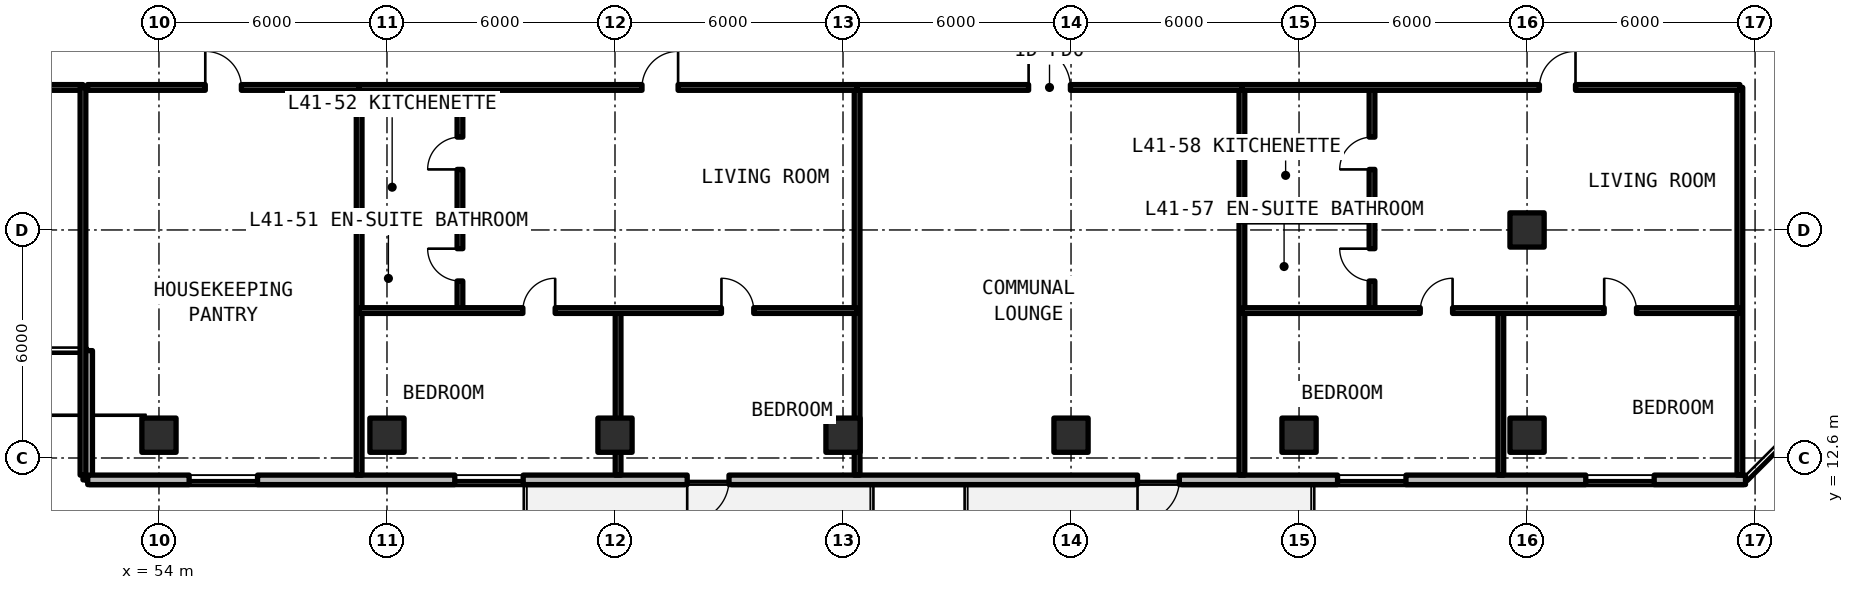
"""IFC4 building model, lengths in metres.
Left out: names, types, materials, properties, quantities, classifications, styles, units other than length and angle.
Written with IfcOpenShell. Run it as: python <this file> out.ifc"""

import sys

from ifc_helpers import new_model, si_unit, direction, frame, frame_2d, origin, origin_2d, place, context, subcontext, project, spatial, rectangle, extrude, element, fill, save


model = new_model("IFC4")
c1 = context("Model", 3, precision=1e-05, world=origin(), true_north=direction((0.0, 1.0)))
c2 = subcontext(c1, "Body", "Model", "MODEL_VIEW")
j1 = project(units=[si_unit("LENGTHUNIT", "METRE"), si_unit("PLANEANGLEUNIT", "RADIAN")], contexts=[c1])
p1 = place(None, origin())
s1 = spatial("IfcSite", under=j1, at=p1, CompositionType="ELEMENT")
p2 = place(p1, origin())
s2 = spatial("IfcBuilding", under=s1, at=p2, CompositionType="ELEMENT")
p3 = place(p2, frame((0.0, 0.0, 148.5)))
s3 = spatial("IfcBuildingStorey", under=s2, at=p3, CompositionType="ELEMENT", Elevation=148.5)
for number, where, z_axis, x_axis in (
    (1, (90.0, 18.6, 0.0), (0.0, 0.0, 1.0), (1.0, 0.0, 0.0)),
    (2, (54.0, 13.2, 0.0), (0.0, 0.0, 1.0), (1.0, 0.0, 0.0)),
    (3, (60.0, 13.2, 0.0), (0.0, 0.0, 1.0), (1.0, 0.0, 0.0)),
    (4, (66.0, 13.2, 0.0), (0.0, 0.0, 1.0), (1.0, 0.0, 0.0)),
    (5, (72.0, 13.2, 0.0), (0.0, 0.0, 1.0), (1.0, 0.0, 0.0)),
    (6, (78.0, 13.2, 0.0), (0.0, 0.0, 1.0), (1.0, 0.0, 0.0)),
    (7, (84.0, 13.2, 0.0), (0.0, 0.0, 1.0), (1.0, 0.0, 0.0)),
    (8, (90.0, 13.2, 0.0), (0.0, 0.0, 1.0), (1.0, 0.0, 0.0)),
):
    element("IfcColumn", number, at=place(p3, frame(where, z_axis=z_axis, x_axis=x_axis)), inside=s3, PredefinedType="COLUMN", context=c2, shape_type="SweptSolid", body=[
        extrude(rectangle(XDim=0.9, YDim=0.9, at=origin_2d()), origin(), (0.0, 0.0, 1.0), 3.3),
    ])
p4 = place(p3, frame((52.125, 15.425, 0.0), z_axis=(0.0, 0.0, 1.0), x_axis=(0.0, -1.0, 0.0)))
e9 = element("IfcWall", 9, at=p4, inside=s3, PredefinedType="SOLIDWALL", context=c2, shape_type="SweptSolid", body=[
    extrude(rectangle(XDim=3.4, YDim=0.25, at=frame_2d((1.7, 0.0))), origin(), (0.0, 0.0, 1.0), 3.08),
])
p5 = place(p3, frame((52.125, 12.025, 0.0), z_axis=(0.0, 0.0, 1.0), x_axis=(1.0, 0.0, 0.0)))
e10 = element("IfcWall", 10, at=p5, inside=s3, PredefinedType="SOLIDWALL", context=c2, shape_type="SweptSolid", body=[
    extrude(rectangle(XDim=43.623, YDim=0.25, at=frame_2d((21.812, 0.0))), origin(), (0.0, 0.0, 1.0), 3.08),
])
p6 = place(p5, frame((15.775, 0.0, 0.0)))
e11 = element("IfcOpeningElement", 11, at=p6, cuts=e10, PredefinedType="OPENING", context=c2, shape_type="SweptSolid", body=[
    extrude(rectangle(XDim=1.1, YDim=2.15, at=frame_2d((0.55, 1.075))), frame((0.0, 0.135, 0.0), z_axis=(0.0, -1.0, 0.0), x_axis=(1.0, 0.0, 0.0)), (0.0, 0.0, 1.0), 0.27),
])
p7 = place(p5, frame((27.625, 0.0, 0.0)))
e12 = element("IfcOpeningElement", 12, at=p7, cuts=e10, PredefinedType="OPENING", context=c2, shape_type="SweptSolid", body=[
    extrude(rectangle(XDim=1.1, YDim=2.15, at=frame_2d((0.55, 1.075))), frame((0.0, 0.135, 0.0), z_axis=(0.0, -1.0, 0.0), x_axis=(1.0, 0.0, 0.0)), (0.0, 0.0, 1.0), 0.27),
])
p8 = place(p5, frame((2.669, 0.0, 0.78)))
e13 = element("IfcOpeningElement", 13, at=p8, cuts=e10, PredefinedType="OPENING", context=c2, shape_type="SweptSolid", body=[
    extrude(rectangle(XDim=1.8, YDim=1.66, at=frame_2d((0.9, 0.83))), frame((0.0, 0.135, 0.0), z_axis=(0.0, -1.0, 0.0), x_axis=(1.0, 0.0, 0.0)), (0.0, 0.0, 1.0), 0.27),
])
p9 = place(p5, frame((9.659, 0.0, 0.78)))
e14 = element("IfcOpeningElement", 14, at=p9, cuts=e10, PredefinedType="OPENING", context=c2, shape_type="SweptSolid", body=[
    extrude(rectangle(XDim=1.8, YDim=1.66, at=frame_2d((0.9, 0.83))), frame((0.0, 0.135, 0.0), z_axis=(0.0, -1.0, 0.0), x_axis=(1.0, 0.0, 0.0)), (0.0, 0.0, 1.0), 0.27),
])
p10 = place(p5, frame((32.888, 0.0, 0.78)))
e15 = element("IfcOpeningElement", 15, at=p10, cuts=e10, PredefinedType="OPENING", context=c2, shape_type="SweptSolid", body=[
    extrude(rectangle(XDim=1.8, YDim=1.66, at=frame_2d((0.9, 0.83))), frame((0.0, 0.135, 0.0), z_axis=(0.0, -1.0, 0.0), x_axis=(1.0, 0.0, 0.0)), (0.0, 0.0, 1.0), 0.27),
])
p11 = place(p5, frame((39.42, 0.0, 0.78)))
e16 = element("IfcOpeningElement", 16, at=p11, cuts=e10, PredefinedType="OPENING", context=c2, shape_type="SweptSolid", body=[
    extrude(rectangle(XDim=1.8, YDim=1.66, at=frame_2d((0.9, 0.83))), frame((0.0, 0.135, 0.0), z_axis=(0.0, -1.0, 0.0), x_axis=(1.0, 0.0, 0.0)), (0.0, 0.0, 1.0), 0.27),
])
p12 = place(p3, frame((43.6, 22.35, 0.0), z_axis=(0.0, 0.0, 1.0), x_axis=(1.0, 0.0, 0.0)))
e17 = element("IfcWall", 17, at=p12, inside=s3, PredefinedType="SOLIDWALL", context=c2, shape_type="SweptSolid", body=[
    extrude(rectangle(XDim=8.4, YDim=0.15, at=frame_2d((4.2, 0.0))), origin(), (0.0, 0.0, 1.0), 2.35),
])
p13 = place(p12, frame((3.65, 0.0, 0.0)))
e18 = element("IfcOpeningElement", 18, at=p13, cuts=e17, PredefinedType="OPENING", context=c2, shape_type="SweptSolid", body=[
    extrude(rectangle(XDim=1.1, YDim=2.15, at=frame_2d((0.55, 1.075))), frame((0.0, 0.085, 0.0), z_axis=(0.0, -1.0, 0.0), x_axis=(1.0, 0.0, 0.0)), (0.0, 0.0, 1.0), 0.17),
])
for number, where, z_axis, x_axis in (
    (19, (52.0, 12.15, 0.0), (0.0, 0.0, 1.0), (0.0, 1.0, 0.0)),
    (20, (95.6, 12.15, 0.0), (0.0, 0.0, 1.0), (0.0, 1.0, 0.0)),
    (21, (59.267, 12.15, 0.0), (0.0, 0.0, 1.0), (0.0, 1.0, 0.0)),
):
    element("IfcWall", number, at=place(p3, frame(where, z_axis=z_axis, x_axis=x_axis)), inside=s3, PredefinedType="SOLIDWALL", context=c2, shape_type="SweptSolid", body=[
        extrude(rectangle(XDim=10.2, YDim=0.15, at=frame_2d((5.1, 0.0))), origin(), (0.0, 0.0, 1.0), 2.35),
    ])
p14 = place(p3, frame((52.12, 22.35, 0.0), z_axis=(0.0, 0.0, 1.0), x_axis=(1.0, 0.0, 0.0)))
e22 = element("IfcWall", 22, at=p14, inside=s3, PredefinedType="SOLIDWALL", context=c2, shape_type="SweptSolid", body=[
    extrude(rectangle(XDim=7.147, YDim=0.15, at=frame_2d((3.574, 0.0))), origin(), (0.0, 0.0, 1.0), 2.35),
])
p15 = place(p14, frame((3.099, 0.0, 0.0)))
e23 = element("IfcOpeningElement", 23, at=p15, cuts=e22, PredefinedType="OPENING", context=c2, shape_type="SweptSolid", body=[
    extrude(rectangle(XDim=0.95, YDim=2.15, at=frame_2d((0.475, 1.075))), frame((0.0, 0.085, 0.0), z_axis=(0.0, -1.0, 0.0), x_axis=(1.0, 0.0, 0.0)), (0.0, 0.0, 1.0), 0.17),
])
p16 = place(p3, frame((72.371, 12.15, 0.0), z_axis=(0.0, 0.0, 1.0), x_axis=(0.0, 1.0, 0.0)))
e24 = element("IfcWall", 24, at=p16, inside=s3, PredefinedType="SOLIDWALL", context=c2, shape_type="SweptSolid", body=[
    extrude(rectangle(XDim=10.2, YDim=0.15, at=frame_2d((5.1, 0.0))), origin(), (0.0, 0.0, 1.0), 2.35),
])
p17 = place(p3, frame((59.267, 18.886, 0.0), z_axis=(0.0, 0.0, 1.0), x_axis=(1.0, 0.0, 0.0)))
e25 = element("IfcWall", 25, at=p17, inside=s3, PredefinedType="PARTITIONING", context=c2, shape_type="SweptSolid", body=[
    extrude(rectangle(XDim=2.653, YDim=0.15, at=frame_2d((1.326, 0.0))), origin(), (0.0, 0.0, 1.0), 2.35),
])
p18 = place(p3, frame((61.92, 16.479, 0.0), z_axis=(0.0, 0.0, 1.0), x_axis=(0.0, 1.0, 0.0)))
e26 = element("IfcWall", 26, at=p18, inside=s3, PredefinedType="PARTITIONING", context=c2, shape_type="SweptSolid", body=[
    extrude(rectangle(XDim=5.871, YDim=0.15, at=frame_2d((2.935, 0.0))), origin(), (0.0, 0.0, 1.0), 2.35),
])
p19 = place(p18, frame((0.779, 0.0, 0.0)))
e27 = element("IfcOpeningElement", 27, at=p19, cuts=e26, PredefinedType="OPENING", context=c2, shape_type="SweptSolid", body=[
    extrude(rectangle(XDim=0.85, YDim=2.1, at=frame_2d((0.425, 1.05))), frame((0.0, 0.085, 0.0), z_axis=(0.0, -1.0, 0.0), x_axis=(1.0, 0.0, 0.0)), (0.0, 0.0, 1.0), 0.17),
])
p20 = place(p18, frame((3.714, 0.0, 0.0)))
e28 = element("IfcOpeningElement", 28, at=p20, cuts=e26, PredefinedType="OPENING", context=c2, shape_type="SweptSolid", body=[
    extrude(rectangle(XDim=0.85, YDim=2.1, at=frame_2d((0.425, 1.05))), frame((0.0, 0.085, 0.0), z_axis=(0.0, -1.0, 0.0), x_axis=(1.0, 0.0, 0.0)), (0.0, 0.0, 1.0), 0.17),
])
p21 = place(p3, frame((66.081, 12.15, 0.0), z_axis=(0.0, 0.0, 1.0), x_axis=(0.0, 1.0, 0.0)))
e29 = element("IfcWall", 29, at=p21, inside=s3, PredefinedType="PARTITIONING", context=c2, shape_type="SweptSolid", body=[
    extrude(rectangle(XDim=4.33, YDim=0.15, at=frame_2d((2.165, 0.0))), origin(), (0.0, 0.0, 1.0), 2.35),
])
p22 = place(p3, frame((59.267, 16.479, 0.0), z_axis=(0.0, 0.0, 1.0), x_axis=(1.0, 0.0, 0.0)))
e30 = element("IfcWall", 30, at=p22, inside=s3, PredefinedType="PARTITIONING", context=c2, shape_type="SweptSolid", body=[
    extrude(rectangle(XDim=13.104, YDim=0.15, at=frame_2d((6.552, 0.0))), origin(), (0.0, 0.0, 1.0), 2.35),
])
p23 = place(p22, frame((4.308, 0.0, 0.0)))
e31 = element("IfcOpeningElement", 31, at=p23, cuts=e30, PredefinedType="OPENING", context=c2, shape_type="SweptSolid", body=[
    extrude(rectangle(XDim=0.85, YDim=2.1, at=frame_2d((0.425, 1.05))), frame((0.0, 0.085, 0.0), z_axis=(0.0, -1.0, 0.0), x_axis=(1.0, 0.0, 0.0)), (0.0, 0.0, 1.0), 0.17),
])
p24 = place(p22, frame((9.534, 0.0, 0.0)))
e32 = element("IfcOpeningElement", 32, at=p24, cuts=e30, PredefinedType="OPENING", context=c2, shape_type="SweptSolid", body=[
    extrude(rectangle(XDim=0.85, YDim=2.1, at=frame_2d((0.425, 1.05))), frame((0.0, 0.085, 0.0), z_axis=(0.0, -1.0, 0.0), x_axis=(1.0, 0.0, 0.0)), (0.0, 0.0, 1.0), 0.17),
])
p25 = place(p3, frame((59.267, 22.35, 0.0), z_axis=(0.0, 0.0, 1.0), x_axis=(1.0, 0.0, 0.0)))
e33 = element("IfcWall", 33, at=p25, inside=s3, PredefinedType="SOLIDWALL", context=c2, shape_type="SweptSolid", body=[
    extrude(rectangle(XDim=13.104, YDim=0.15, at=frame_2d((6.552, 0.0))), origin(), (0.0, 0.0, 1.0), 2.35),
])
p26 = place(p25, frame((7.443, 0.0, 0.0)))
e34 = element("IfcOpeningElement", 34, at=p26, cuts=e33, PredefinedType="OPENING", context=c2, shape_type="SweptSolid", body=[
    extrude(rectangle(XDim=0.95, YDim=2.15, at=frame_2d((0.475, 1.075))), frame((0.0, 0.085, 0.0), z_axis=(0.0, -1.0, 0.0), x_axis=(1.0, 0.0, 0.0)), (0.0, 0.0, 1.0), 0.17),
])
p27 = place(p3, frame((82.497, 12.15, 0.0), z_axis=(0.0, 0.0, 1.0), x_axis=(0.0, 1.0, 0.0)))
e35 = element("IfcWall", 35, at=p27, inside=s3, PredefinedType="SOLIDWALL", context=c2, shape_type="SweptSolid", body=[
    extrude(rectangle(XDim=10.2, YDim=0.15, at=frame_2d((5.1, 0.0))), origin(), (0.0, 0.0, 1.0), 2.35),
])
p28 = place(p3, frame((72.371, 22.35, 0.0), z_axis=(0.0, 0.0, 1.0), x_axis=(1.0, 0.0, 0.0)))
e36 = element("IfcWall", 36, at=p28, inside=s3, PredefinedType="SOLIDWALL", context=c2, shape_type="SweptSolid", body=[
    extrude(rectangle(XDim=10.125, YDim=0.15, at=frame_2d((5.063, 0.0))), origin(), (0.0, 0.0, 1.0), 2.35),
])
p29 = place(p28, frame((4.513, 0.0, 0.0)))
e37 = element("IfcOpeningElement", 37, at=p29, cuts=e36, PredefinedType="OPENING", context=c2, shape_type="SweptSolid", body=[
    extrude(rectangle(XDim=1.1, YDim=2.15, at=frame_2d((0.55, 1.075))), frame((0.0, 0.085, 0.0), z_axis=(0.0, -1.0, 0.0), x_axis=(1.0, 0.0, 0.0)), (0.0, 0.0, 1.0), 0.17),
])
p30 = place(p3, frame((82.497, 18.886, 0.0), z_axis=(0.0, 0.0, 1.0), x_axis=(1.0, 0.0, 0.0)))
e38 = element("IfcWall", 38, at=p30, inside=s3, PredefinedType="PARTITIONING", context=c2, shape_type="SweptSolid", body=[
    extrude(rectangle(XDim=3.423, YDim=0.15, at=frame_2d((1.712, 0.0))), origin(), (0.0, 0.0, 1.0), 2.35),
])
p31 = place(p3, frame((85.92, 16.479, 0.0), z_axis=(0.0, 0.0, 1.0), x_axis=(0.0, 1.0, 0.0)))
e39 = element("IfcWall", 39, at=p31, inside=s3, PredefinedType="PARTITIONING", context=c2, shape_type="SweptSolid", body=[
    extrude(rectangle(XDim=5.871, YDim=0.15, at=frame_2d((2.935, 0.0))), origin(), (0.0, 0.0, 1.0), 2.35),
])
p32 = place(p31, frame((0.779, 0.0, 0.0)))
e40 = element("IfcOpeningElement", 40, at=p32, cuts=e39, PredefinedType="OPENING", context=c2, shape_type="SweptSolid", body=[
    extrude(rectangle(XDim=0.85, YDim=2.1, at=frame_2d((0.425, 1.05))), frame((0.0, 0.085, 0.0), z_axis=(0.0, -1.0, 0.0), x_axis=(1.0, 0.0, 0.0)), (0.0, 0.0, 1.0), 0.17),
])
p33 = place(p31, frame((3.714, 0.0, 0.0)))
e41 = element("IfcOpeningElement", 41, at=p33, cuts=e39, PredefinedType="OPENING", context=c2, shape_type="SweptSolid", body=[
    extrude(rectangle(XDim=0.85, YDim=2.1, at=frame_2d((0.425, 1.05))), frame((0.0, 0.085, 0.0), z_axis=(0.0, -1.0, 0.0), x_axis=(1.0, 0.0, 0.0)), (0.0, 0.0, 1.0), 0.17),
])
p34 = place(p3, frame((89.31, 12.15, 0.0), z_axis=(0.0, 0.0, 1.0), x_axis=(0.0, 1.0, 0.0)))
e42 = element("IfcWall", 42, at=p34, inside=s3, PredefinedType="PARTITIONING", context=c2, shape_type="SweptSolid", body=[
    extrude(rectangle(XDim=4.33, YDim=0.15, at=frame_2d((2.165, 0.0))), origin(), (0.0, 0.0, 1.0), 2.35),
])
p35 = place(p3, frame((82.497, 16.479, 0.0), z_axis=(0.0, 0.0, 1.0), x_axis=(1.0, 0.0, 0.0)))
e43 = element("IfcWall", 43, at=p35, inside=s3, PredefinedType="PARTITIONING", context=c2, shape_type="SweptSolid", body=[
    extrude(rectangle(XDim=13.104, YDim=0.15, at=frame_2d((6.552, 0.0))), origin(), (0.0, 0.0, 1.0), 2.35),
])
p36 = place(p35, frame((4.694, 0.0, 0.0)))
e44 = element("IfcOpeningElement", 44, at=p36, cuts=e43, PredefinedType="OPENING", context=c2, shape_type="SweptSolid", body=[
    extrude(rectangle(XDim=0.85, YDim=2.1, at=frame_2d((0.425, 1.05))), frame((0.0, 0.085, 0.0), z_axis=(0.0, -1.0, 0.0), x_axis=(1.0, 0.0, 0.0)), (0.0, 0.0, 1.0), 0.17),
])
p37 = place(p35, frame((9.534, 0.0, 0.0)))
e45 = element("IfcOpeningElement", 45, at=p37, cuts=e43, PredefinedType="OPENING", context=c2, shape_type="SweptSolid", body=[
    extrude(rectangle(XDim=0.85, YDim=2.1, at=frame_2d((0.425, 1.05))), frame((0.0, 0.085, 0.0), z_axis=(0.0, -1.0, 0.0), x_axis=(1.0, 0.0, 0.0)), (0.0, 0.0, 1.0), 0.17),
])
p38 = place(p3, frame((82.497, 22.35, 0.0), z_axis=(0.0, 0.0, 1.0), x_axis=(1.0, 0.0, 0.0)))
e46 = element("IfcWall", 46, at=p38, inside=s3, PredefinedType="SOLIDWALL", context=c2, shape_type="SweptSolid", body=[
    extrude(rectangle(XDim=13.104, YDim=0.15, at=frame_2d((6.552, 0.0))), origin(), (0.0, 0.0, 1.0), 2.35),
])
p39 = place(p38, frame((7.829, 0.0, 0.0)))
e47 = element("IfcOpeningElement", 47, at=p39, cuts=e46, PredefinedType="OPENING", context=c2, shape_type="SweptSolid", body=[
    extrude(rectangle(XDim=0.95, YDim=2.15, at=frame_2d((0.475, 1.075))), frame((0.0, 0.085, 0.0), z_axis=(0.0, -1.0, 0.0), x_axis=(1.0, 0.0, 0.0)), (0.0, 0.0, 1.0), 0.17),
])
p40 = place(p6, frame((1.1, 0.0, 0.0), z_axis=(0.0, 0.0, 1.0), x_axis=(-1.0, 0.0, 0.0)))
e48 = element("IfcDoor", 48, at=p40, inside=s3, OperationType="SINGLE_SWING_LEFT", PredefinedType="DOOR", context=c2, shape_type="SweptSolid", body=[
    extrude(rectangle(XDim=1.1, YDim=2.15, at=frame_2d((0.55, 1.075))), frame((0.0, 0.025, 0.0), z_axis=(0.0, -1.0, 0.0), x_axis=(1.0, 0.0, 0.0)), (0.0, 0.0, 1.0), 0.05),
])
fill(e11, e48)
p41 = place(p7, frame((1.1, 0.0, 0.0), z_axis=(0.0, 0.0, 1.0), x_axis=(-1.0, 0.0, 0.0)))
e49 = element("IfcDoor", 49, at=p41, inside=s3, OperationType="SINGLE_SWING_RIGHT", PredefinedType="DOOR", context=c2, shape_type="SweptSolid", body=[
    extrude(rectangle(XDim=1.1, YDim=2.15, at=frame_2d((0.55, 1.075))), frame((0.0, 0.025, 0.0), z_axis=(0.0, -1.0, 0.0), x_axis=(1.0, 0.0, 0.0)), (0.0, 0.0, 1.0), 0.05),
])
fill(e12, e49)
p42 = place(p8, origin())
e50 = element("IfcWindow", 50, at=p42, inside=s3, PartitioningType="SINGLE_PANEL", PredefinedType="WINDOW", context=c2, shape_type="SweptSolid", body=[
    extrude(rectangle(XDim=1.8, YDim=1.66, at=frame_2d((0.9, 0.83))), frame((0.0, 0.03, 0.0), z_axis=(0.0, -1.0, 0.0), x_axis=(1.0, 0.0, 0.0)), (0.0, 0.0, 1.0), 0.06),
])
fill(e13, e50)
p43 = place(p9, origin())
e51 = element("IfcWindow", 51, at=p43, inside=s3, PartitioningType="SINGLE_PANEL", PredefinedType="WINDOW", context=c2, shape_type="SweptSolid", body=[
    extrude(rectangle(XDim=1.8, YDim=1.66, at=frame_2d((0.9, 0.83))), frame((0.0, 0.03, 0.0), z_axis=(0.0, -1.0, 0.0), x_axis=(1.0, 0.0, 0.0)), (0.0, 0.0, 1.0), 0.06),
])
fill(e14, e51)
p44 = place(p10, origin())
e52 = element("IfcWindow", 52, at=p44, inside=s3, PartitioningType="SINGLE_PANEL", PredefinedType="WINDOW", context=c2, shape_type="SweptSolid", body=[
    extrude(rectangle(XDim=1.8, YDim=1.66, at=frame_2d((0.9, 0.83))), frame((0.0, 0.03, 0.0), z_axis=(0.0, -1.0, 0.0), x_axis=(1.0, 0.0, 0.0)), (0.0, 0.0, 1.0), 0.06),
])
fill(e15, e52)
p45 = place(p11, origin())
e53 = element("IfcWindow", 53, at=p45, inside=s3, PartitioningType="SINGLE_PANEL", PredefinedType="WINDOW", context=c2, shape_type="SweptSolid", body=[
    extrude(rectangle(XDim=1.8, YDim=1.66, at=frame_2d((0.9, 0.83))), frame((0.0, 0.03, 0.0), z_axis=(0.0, -1.0, 0.0), x_axis=(1.0, 0.0, 0.0)), (0.0, 0.0, 1.0), 0.06),
])
fill(e16, e53)
p46 = place(p15, origin())
e54 = element("IfcDoor", 54, at=p46, inside=s3, OperationType="SINGLE_SWING_LEFT", PredefinedType="DOOR", context=c2, shape_type="SweptSolid", body=[
    extrude(rectangle(XDim=0.95, YDim=2.15, at=frame_2d((0.475, 1.075))), frame((0.0, 0.025, 0.0), z_axis=(0.0, -1.0, 0.0), x_axis=(1.0, 0.0, 0.0)), (0.0, 0.0, 1.0), 0.05),
])
fill(e23, e54)
p47 = place(p19, origin())
e55 = element("IfcDoor", 55, at=p47, inside=s3, OperationType="SINGLE_SWING_RIGHT", PredefinedType="DOOR", context=c2, shape_type="SweptSolid", body=[
    extrude(rectangle(XDim=0.85, YDim=2.1, at=frame_2d((0.425, 1.05))), frame((0.0, 0.025, 0.0), z_axis=(0.0, -1.0, 0.0), x_axis=(1.0, 0.0, 0.0)), (0.0, 0.0, 1.0), 0.05),
])
fill(e27, e55)
p48 = place(p20, origin())
e56 = element("IfcDoor", 56, at=p48, inside=s3, OperationType="SINGLE_SWING_LEFT", PredefinedType="DOOR", context=c2, shape_type="SweptSolid", body=[
    extrude(rectangle(XDim=0.85, YDim=2.1, at=frame_2d((0.425, 1.05))), frame((0.0, 0.025, 0.0), z_axis=(0.0, -1.0, 0.0), x_axis=(1.0, 0.0, 0.0)), (0.0, 0.0, 1.0), 0.05),
])
fill(e28, e56)
p49 = place(p23, origin())
e57 = element("IfcDoor", 57, at=p49, inside=s3, OperationType="SINGLE_SWING_RIGHT", PredefinedType="DOOR", context=c2, shape_type="SweptSolid", body=[
    extrude(rectangle(XDim=0.85, YDim=2.1, at=frame_2d((0.425, 1.05))), frame((0.0, 0.025, 0.0), z_axis=(0.0, -1.0, 0.0), x_axis=(1.0, 0.0, 0.0)), (0.0, 0.0, 1.0), 0.05),
])
fill(e31, e57)
p50 = place(p24, origin())
e58 = element("IfcDoor", 58, at=p50, inside=s3, OperationType="SINGLE_SWING_LEFT", PredefinedType="DOOR", context=c2, shape_type="SweptSolid", body=[
    extrude(rectangle(XDim=0.85, YDim=2.1, at=frame_2d((0.425, 1.05))), frame((0.0, 0.025, 0.0), z_axis=(0.0, -1.0, 0.0), x_axis=(1.0, 0.0, 0.0)), (0.0, 0.0, 1.0), 0.05),
])
fill(e32, e58)
p51 = place(p26, origin())
e59 = element("IfcDoor", 59, at=p51, inside=s3, OperationType="SINGLE_SWING_RIGHT", PredefinedType="DOOR", context=c2, shape_type="SweptSolid", body=[
    extrude(rectangle(XDim=0.95, YDim=2.15, at=frame_2d((0.475, 1.075))), frame((0.0, 0.025, 0.0), z_axis=(0.0, -1.0, 0.0), x_axis=(1.0, 0.0, 0.0)), (0.0, 0.0, 1.0), 0.05),
])
fill(e34, e59)
p52 = place(p29, origin())
e60 = element("IfcDoor", 60, at=p52, inside=s3, OperationType="SINGLE_SWING_LEFT", PredefinedType="DOOR", context=c2, shape_type="SweptSolid", body=[
    extrude(rectangle(XDim=1.1, YDim=2.15, at=frame_2d((0.55, 1.075))), frame((0.0, 0.025, 0.0), z_axis=(0.0, -1.0, 0.0), x_axis=(1.0, 0.0, 0.0)), (0.0, 0.0, 1.0), 0.05),
])
fill(e37, e60)
p53 = place(p32, origin())
e61 = element("IfcDoor", 61, at=p53, inside=s3, OperationType="SINGLE_SWING_RIGHT", PredefinedType="DOOR", context=c2, shape_type="SweptSolid", body=[
    extrude(rectangle(XDim=0.85, YDim=2.1, at=frame_2d((0.425, 1.05))), frame((0.0, 0.025, 0.0), z_axis=(0.0, -1.0, 0.0), x_axis=(1.0, 0.0, 0.0)), (0.0, 0.0, 1.0), 0.05),
])
fill(e40, e61)
p54 = place(p33, origin())
e62 = element("IfcDoor", 62, at=p54, inside=s3, OperationType="SINGLE_SWING_LEFT", PredefinedType="DOOR", context=c2, shape_type="SweptSolid", body=[
    extrude(rectangle(XDim=0.85, YDim=2.1, at=frame_2d((0.425, 1.05))), frame((0.0, 0.025, 0.0), z_axis=(0.0, -1.0, 0.0), x_axis=(1.0, 0.0, 0.0)), (0.0, 0.0, 1.0), 0.05),
])
fill(e41, e62)
p55 = place(p36, origin())
e63 = element("IfcDoor", 63, at=p55, inside=s3, OperationType="SINGLE_SWING_RIGHT", PredefinedType="DOOR", context=c2, shape_type="SweptSolid", body=[
    extrude(rectangle(XDim=0.85, YDim=2.1, at=frame_2d((0.425, 1.05))), frame((0.0, 0.025, 0.0), z_axis=(0.0, -1.0, 0.0), x_axis=(1.0, 0.0, 0.0)), (0.0, 0.0, 1.0), 0.05),
])
fill(e44, e63)
p56 = place(p37, origin())
e64 = element("IfcDoor", 64, at=p56, inside=s3, OperationType="SINGLE_SWING_LEFT", PredefinedType="DOOR", context=c2, shape_type="SweptSolid", body=[
    extrude(rectangle(XDim=0.85, YDim=2.1, at=frame_2d((0.425, 1.05))), frame((0.0, 0.025, 0.0), z_axis=(0.0, -1.0, 0.0), x_axis=(1.0, 0.0, 0.0)), (0.0, 0.0, 1.0), 0.05),
])
fill(e45, e64)
p57 = place(p39, origin())
e65 = element("IfcDoor", 65, at=p57, inside=s3, OperationType="SINGLE_SWING_RIGHT", PredefinedType="DOOR", context=c2, shape_type="SweptSolid", body=[
    extrude(rectangle(XDim=0.95, YDim=2.15, at=frame_2d((0.475, 1.075))), frame((0.0, 0.025, 0.0), z_axis=(0.0, -1.0, 0.0), x_axis=(1.0, 0.0, 0.0)), (0.0, 0.0, 1.0), 0.05),
])
fill(e47, e65)
save(model, sys.argv[1])
